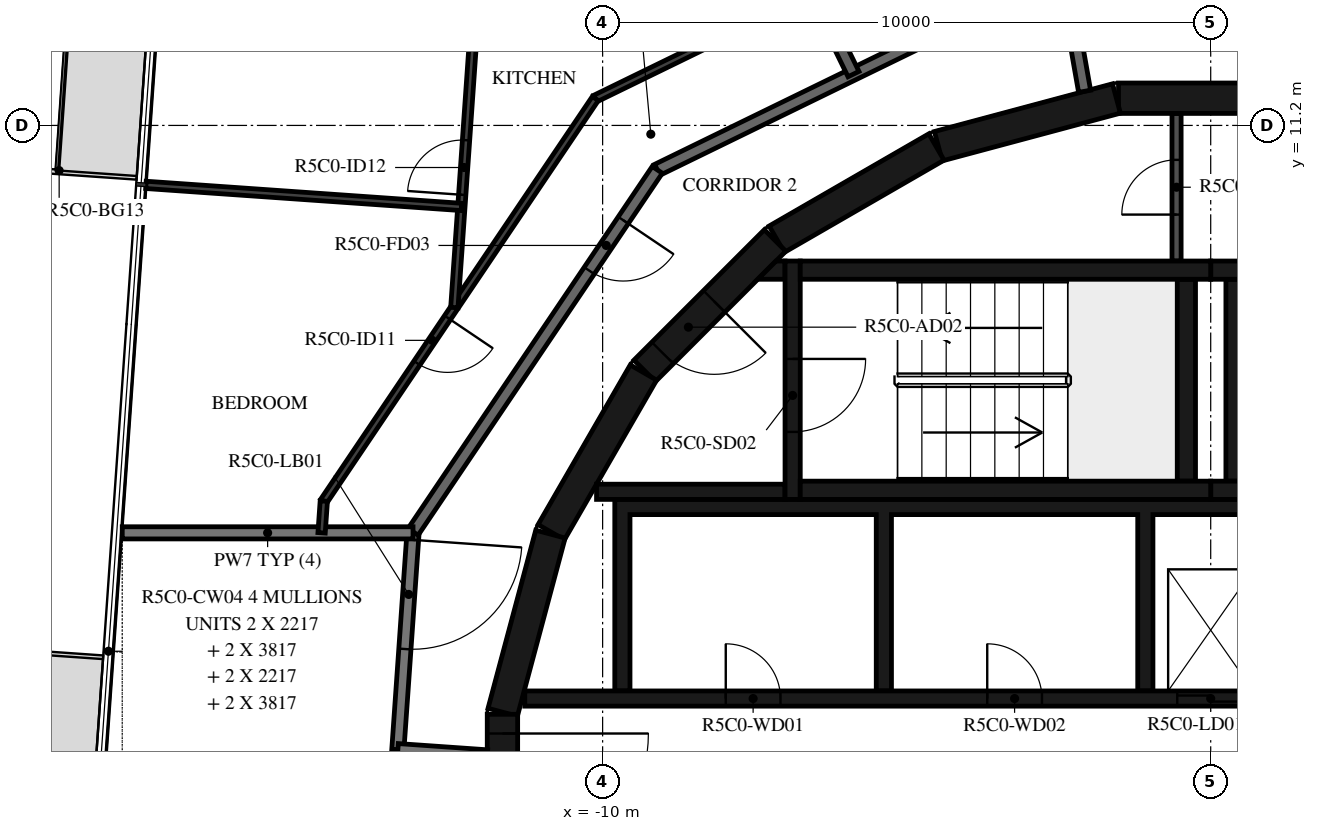
"""IFC4 building model, lengths in metres.
Left out: names, types, materials, properties, quantities, classifications, styles, units other than length and angle.
Written with IfcOpenShell. Run it as: python <this file> out.ifc"""

import sys

from ifc_helpers import new_model, si_unit, direction, frame, frame_2d, origin, place, context, subcontext, project, spatial, polyline, rectangle, outline, extrude, element, fill, save


model = new_model("IFC4")
c1 = context("Model", 3, precision=1e-05, world=origin(), true_north=direction((0.0, 1.0)))
c2 = subcontext(c1, "Body", "Model", "MODEL_VIEW")
j1 = project(units=[si_unit("LENGTHUNIT", "METRE"), si_unit("PLANEANGLEUNIT", "RADIAN")], contexts=[c1])
p1 = place(None, origin())
s1 = spatial("IfcSite", under=j1, at=p1, CompositionType="ELEMENT")
p2 = place(p1, origin())
s2 = spatial("IfcBuilding", under=s1, at=p2, CompositionType="ELEMENT")
p3 = place(p2, frame((0.0, 0.0, 216.4)))
s3 = spatial("IfcBuildingStorey", under=s2, at=p3, CompositionType="ELEMENT", Elevation=216.4)
for number, where, z_axis, x_axis in (
    (1, (1.516, 11.647, 0.0), (0.0, 0.0, 1.0), (-1.0, 0.0, 0.0)),
    (2, (-1.55, 11.643, 0.0), (0.0, 0.0, 1.0), (-0.966, -0.259, 0.0)),
    (3, (-4.51, 10.845, 0.0), (0.0, 0.0, 1.0), (-0.866, -0.5, 0.0)),
):
    element("IfcWall", number, at=place(p3, frame(where, z_axis=z_axis, x_axis=x_axis)), inside=s3, PredefinedType="SHEAR", context=c2, shape_type="SweptSolid", body=[
        extrude(rectangle(XDim=3.033, YDim=0.5, at=frame_2d((1.516, 0.0))), origin(), (0.0, 0.0, 1.0), 3.05),
    ])
p4 = place(p3, frame((-7.164, 9.308, 0.0), z_axis=(0.0, 0.0, 1.0), x_axis=(-0.707106781187, -0.707106781187, 0.0)))
e4 = element("IfcWall", 4, at=p4, inside=s3, PredefinedType="SHEAR", context=c2, shape_type="SweptSolid", body=[
    extrude(rectangle(XDim=3.032, YDim=0.5, at=frame_2d((1.516, 0.0))), origin(), (0.0, 0.0, 1.0), 3.05),
])
p5 = place(p4, frame((1.416, 0.0, 0.0)))
e5 = element("IfcOpeningElement", 5, at=p5, cuts=e4, PredefinedType="OPENING", context=c2, shape_type="SweptSolid", body=[
    extrude(rectangle(XDim=1.2, YDim=2.1, at=frame_2d((0.6, 1.05))), frame((0.0, 0.26, 0.0), z_axis=(0.0, -1.0, 0.0), x_axis=(1.0, 0.0, 0.0)), (0.0, 0.0, 1.0), 0.52),
])
for number, where, z_axis, x_axis in (
    (6, (-9.329, 7.137, 0.0), (0.0, 0.0, 1.0), (-0.5, -0.866, 0.0)),
    (7, (-10.858, 4.479, 0.0), (0.0, 0.0, 1.0), (-0.259, -0.966, 0.0)),
):
    element("IfcWall", number, at=place(p3, frame(where, z_axis=z_axis, x_axis=x_axis)), inside=s3, PredefinedType="SHEAR", context=c2, shape_type="SweptSolid", body=[
        extrude(rectangle(XDim=3.033, YDim=0.5, at=frame_2d((1.516, 0.0))), origin(), (0.0, 0.0, 1.0), 3.05),
    ])
p6 = place(p3, frame((-11.647, 1.516, 0.0), z_axis=(0.0, 0.0, 1.0), x_axis=(0.0, -1.0, 0.0)))
e8 = element("IfcWall", 8, at=p6, inside=s3, PredefinedType="SHEAR", context=c2, shape_type="SweptSolid", body=[
    extrude(rectangle(XDim=3.033, YDim=0.5, at=frame_2d((1.516, 0.0))), origin(), (0.0, 0.0, 1.0), 3.05),
])
p7 = place(p6, frame((0.316, 0.0, 0.0)))
e9 = element("IfcOpeningElement", 9, at=p7, cuts=e8, PredefinedType="OPENING", context=c2, shape_type="SweptSolid", body=[
    extrude(rectangle(XDim=2.4, YDim=2.1, at=frame_2d((1.2, 1.05))), frame((0.0, 0.26, 0.0), z_axis=(0.0, -1.0, 0.0), x_axis=(1.0, 0.0, 0.0)), (0.0, 0.0, 1.0), 0.52),
])
for number, where, z_axis, x_axis in (
    (10, (0.0, 5.2, 0.0), (0.0, 0.0, 1.0), (1.0, 0.0, 0.0)),
    (11, (0.0, 8.82, 0.0), (0.0, 0.0, 1.0), (1.0, 0.0, 0.0)),
):
    element("IfcWall", number, at=place(p3, frame(where, z_axis=z_axis, x_axis=x_axis)), inside=s3, PredefinedType="SHEAR", context=c2, shape_type="SweptSolid", body=[
        extrude(rectangle(XDim=6.75, YDim=0.3, at=frame_2d((3.375, 0.0))), origin(), (0.0, 0.0, 1.0), 3.05),
    ])
p8 = place(p3, frame((0.4, 5.35, 0.0), z_axis=(0.0, 0.0, 1.0), x_axis=(0.0, 1.0, 0.0)))
e12 = element("IfcWall", 12, at=p8, inside=s3, PredefinedType="SHEAR", context=c2, shape_type="SweptSolid", body=[
    extrude(rectangle(XDim=3.32, YDim=0.3, at=frame_2d((1.66, 0.0))), origin(), (0.0, 0.0, 1.0), 3.05),
])
for number, where, z_axis, x_axis in (
    (13, (-6.75, 5.2, 0.0), (0.0, 0.0, 1.0), (1.0, 0.0, 0.0)),
    (14, (-6.75, 8.82, 0.0), (0.0, 0.0, 1.0), (1.0, 0.0, 0.0)),
):
    element("IfcWall", number, at=place(p3, frame(where, z_axis=z_axis, x_axis=x_axis)), inside=s3, PredefinedType="SHEAR", context=c2, shape_type="SweptSolid", body=[
        extrude(rectangle(XDim=6.75, YDim=0.3, at=frame_2d((3.375, 0.0))), origin(), (0.0, 0.0, 1.0), 3.05),
    ])
p9 = place(p3, frame((-0.4, 5.35, 0.0), z_axis=(0.0, 0.0, 1.0), x_axis=(0.0, 1.0, 0.0)))
e15 = element("IfcWall", 15, at=p9, inside=s3, PredefinedType="SHEAR", context=c2, shape_type="SweptSolid", body=[
    extrude(rectangle(XDim=3.32, YDim=0.3, at=frame_2d((1.66, 0.0))), origin(), (0.0, 0.0, 1.0), 3.05),
])
p10 = place(p3, frame((-6.875, 8.97, 0.0), z_axis=(0.0, 0.0, 1.0), x_axis=(0.0, -1.0, 0.0)))
e16 = element("IfcWall", 16, at=p10, inside=s3, PredefinedType="SHEAR", context=c2, shape_type="SweptSolid", body=[
    extrude(rectangle(XDim=3.92, YDim=0.25, at=frame_2d((1.96, 0.0))), origin(), (0.0, 0.0, 1.0), 3.05),
])
p11 = place(p10, frame((1.61, 0.0, 0.0)))
e17 = element("IfcOpeningElement", 17, at=p11, cuts=e16, PredefinedType="OPENING", context=c2, shape_type="SweptSolid", body=[
    extrude(rectangle(XDim=1.2, YDim=2.1, at=frame_2d((0.6, 1.05))), frame((0.0, 0.135, 0.0), z_axis=(0.0, -1.0, 0.0), x_axis=(1.0, 0.0, 0.0)), (0.0, 0.0, 1.0), 0.27),
])
p12 = place(p3, frame((-7.0, 5.175, 0.0), z_axis=(0.0, 0.0, 1.0), x_axis=(-1.0, 0.0, 0.0)))
e18 = element("IfcWall", 18, at=p12, inside=s3, PredefinedType="SHEAR", context=c2, shape_type="SweptSolid", body=[
    extrude(rectangle(XDim=3.1, YDim=0.25, at=frame_2d((1.55, 0.0))), origin(), (0.0, 0.0, 1.0), 3.05),
])
p13 = place(p3, origin())
e19 = element("IfcWall", 19, at=p13, inside=s3, PredefinedType="SHEAR", context=c2, shape_type="SweptSolid", body=[
    extrude(outline(polyline([(-7.148, 8.97), (-7.0, 8.97), (-7.0, 8.67), (-7.448, 8.67), (-7.148, 8.97)])), origin(), (0.0, 0.0, 1.0), 3.05),
])
p14 = place(p3, origin())
e20 = element("IfcWall", 20, at=p14, inside=s3, PredefinedType="SHEAR", context=c2, shape_type="SweptSolid", body=[
    extrude(outline(polyline([(-9.55, 4.8), (-5.5, 4.8), (-5.5, 1.9), (-5.25, 1.9), (-5.25, 4.8), (-1.2, 4.8), (-1.2, 1.9), (-0.95, 1.9), (-0.95, 4.8), (0.95, 4.8), (0.95, 1.9), (1.2, 1.9), (1.2, 4.8), (3.1, 4.8), (3.1, 1.9), (3.35, 1.9), (3.35, 4.8), (5.25, 4.8), (5.25, 1.9), (5.5, 1.9), (5.5, 4.8), (7.4, 4.8), (7.4, 1.9), (7.65, 1.9), (7.65, 4.8), (9.55, 4.8), (9.55, 1.9), (9.8, 1.9), (9.8, 4.8), (9.8, 5.05), (-9.8, 5.05), (-9.8, 4.8), (-9.8, 1.9), (-9.55, 1.9), (-9.55, 4.8)])), origin(), (0.0, 0.0, 1.0), 3.05),
])
p15 = place(p3, frame((-11.28, 1.775, 0.0), z_axis=(0.0, 0.0, 1.0), x_axis=(1.0, 0.0, 0.0)))
e21 = element("IfcWall", 21, at=p15, inside=s3, PredefinedType="SHEAR", context=c2, shape_type="SweptSolid", body=[
    extrude(rectangle(XDim=14.38, YDim=0.25, at=frame_2d((7.19, 0.0))), origin(), (0.0, 0.0, 1.0), 3.05),
])
p16 = place(p15, frame((10.73, 0.0, 0.0)))
e22 = element("IfcOpeningElement", 22, at=p16, cuts=e21, PredefinedType="OPENING", context=c2, shape_type="SweptSolid", body=[
    extrude(rectangle(XDim=1.1, YDim=2.1, at=frame_2d((0.55, 1.05))), frame((0.0, 0.135, 0.0), z_axis=(0.0, -1.0, 0.0), x_axis=(1.0, 0.0, 0.0)), (0.0, 0.0, 1.0), 0.27),
])
p17 = place(p15, frame((12.88, 0.0, 0.0)))
e23 = element("IfcOpeningElement", 23, at=p17, cuts=e21, PredefinedType="OPENING", context=c2, shape_type="SweptSolid", body=[
    extrude(rectangle(XDim=1.1, YDim=2.1, at=frame_2d((0.55, 1.05))), frame((0.0, 0.135, 0.0), z_axis=(0.0, -1.0, 0.0), x_axis=(1.0, 0.0, 0.0)), (0.0, 0.0, 1.0), 0.27),
])
p18 = place(p15, frame((3.305, 0.0, 0.0)))
e24 = element("IfcOpeningElement", 24, at=p18, cuts=e21, PredefinedType="OPENING", context=c2, shape_type="SweptSolid", body=[
    extrude(rectangle(XDim=0.9, YDim=2.1, at=frame_2d((0.45, 1.05))), frame((0.0, 0.135, 0.0), z_axis=(0.0, -1.0, 0.0), x_axis=(1.0, 0.0, 0.0)), (0.0, 0.0, 1.0), 0.27),
])
p19 = place(p15, frame((7.605, 0.0, 0.0)))
e25 = element("IfcOpeningElement", 25, at=p19, cuts=e21, PredefinedType="OPENING", context=c2, shape_type="SweptSolid", body=[
    extrude(rectangle(XDim=0.9, YDim=2.1, at=frame_2d((0.45, 1.05))), frame((0.0, 0.135, 0.0), z_axis=(0.0, -1.0, 0.0), x_axis=(1.0, 0.0, 0.0)), (0.0, 0.0, 1.0), 0.27),
])
p20 = place(p3, frame((-0.562, 8.97, 0.0), z_axis=(0.0, 0.0, 1.0), x_axis=(0.0, 1.0, 0.0)))
e26 = element("IfcWall", 26, at=p20, inside=s3, PredefinedType="PARTITIONING", context=c2, shape_type="SweptSolid", body=[
    extrude(rectangle(XDim=2.427, YDim=0.15, at=frame_2d((1.214, 0.0))), origin(), (0.0, 0.0, 1.0), 3.05),
])
p21 = place(p20, frame((0.764, 0.0, 0.0)))
e27 = element("IfcOpeningElement", 27, at=p21, cuts=e26, PredefinedType="OPENING", context=c2, shape_type="SweptSolid", body=[
    extrude(rectangle(XDim=0.9, YDim=2.1, at=frame_2d((0.45, 1.05))), frame((0.0, 0.085, 0.0), z_axis=(0.0, -1.0, 0.0), x_axis=(1.0, 0.0, 0.0)), (0.0, 0.0, 1.0), 0.17),
])
p22 = place(p3, frame((-13.118, 4.5, 0.0), z_axis=(0.0, 0.0, 1.0), x_axis=(-0.069746872611, -0.99756472159, 0.0)))
e28 = element("IfcWall", 28, at=p22, inside=s3, PredefinedType="STANDARD", context=c2, shape_type="SweptSolid", body=[
    extrude(rectangle(XDim=3.574, YDim=0.2, at=frame_2d((1.787, 0.0))), origin(), (0.0, 0.0, 1.0), 3.05),
])
p23 = place(p22, frame((0.115, 0.0, 0.0)))
e29 = element("IfcOpeningElement", 29, at=p23, cuts=e28, PredefinedType="OPENING", context=c2, shape_type="SweptSolid", body=[
    extrude(rectangle(XDim=1.8, YDim=2.1, at=frame_2d((0.9, 1.05))), frame((0.0, 0.11, 0.0), z_axis=(0.0, -1.0, 0.0), x_axis=(1.0, 0.0, 0.0)), (0.0, 0.0, 1.0), 0.22),
])
p24 = place(p3, frame((-13.367, 0.935, 0.0), z_axis=(0.0, 0.0, 1.0), x_axis=(0.997553656289, -0.069904955655, 0.0)))
e30 = element("IfcWall", 30, at=p24, inside=s3, PredefinedType="STANDARD", context=c2, shape_type="SweptSolid", body=[
    extrude(rectangle(XDim=1.474, YDim=0.2, at=frame_2d((0.737, 0.0))), origin(), (0.0, 0.0, 1.0), 3.05),
])
p25 = place(p3, frame((-2.074, 11.761, 0.0), z_axis=(0.0, 0.0, 1.0), x_axis=(-0.173740587112, 0.984791454263, 0.0)))
e31 = element("IfcWall", 31, at=p25, inside=s3, PredefinedType="STANDARD", context=c2, shape_type="SweptSolid", body=[
    extrude(rectangle(XDim=1.867, YDim=0.2, at=frame_2d((0.934, 0.0))), origin(), (0.0, 0.0, 1.0), 3.05),
])
p26 = place(p3, frame((-2.647, 13.618, 0.0), z_axis=(0.0, 0.0, 1.0), x_axis=(-0.898796543751, -0.438366026218, 0.0)))
e32 = element("IfcWall", 32, at=p26, inside=s3, PredefinedType="STANDARD", context=c2, shape_type="SweptSolid", body=[
    extrude(rectangle(XDim=7.181, YDim=0.2, at=frame_2d((3.591, 0.0))), origin(), (0.0, 0.0, 1.0), 3.05),
])
p27 = place(p3, frame((-9.101, 10.47, 0.0), z_axis=(0.0, 0.0, 1.0), x_axis=(-0.559195469534, -0.829035841718, 0.0)))
e33 = element("IfcWall", 33, at=p27, inside=s3, PredefinedType="STANDARD", context=c2, shape_type="SweptSolid", body=[
    extrude(rectangle(XDim=7.181, YDim=0.2, at=frame_2d((3.591, 0.0))), origin(), (0.0, 0.0, 1.0), 3.05),
])
p28 = place(p27, frame((1.0, 0.0, 0.0)))
e34 = element("IfcOpeningElement", 34, at=p28, cuts=e33, PredefinedType="OPENING", context=c2, shape_type="SweptSolid", body=[
    extrude(rectangle(XDim=1.0, YDim=2.1, at=frame_2d((0.5, 1.05))), frame((0.0, 0.11, 0.0), z_axis=(0.0, -1.0, 0.0), x_axis=(1.0, 0.0, 0.0)), (0.0, 0.0, 1.0), 0.22),
])
p29 = place(p3, frame((-13.118, 4.5, 0.0), z_axis=(0.0, 0.0, 1.0), x_axis=(-1.0, 0.0, 0.0)))
e35 = element("IfcWall", 35, at=p29, inside=s3, PredefinedType="STANDARD", context=c2, shape_type="SweptSolid", body=[
    extrude(rectangle(XDim=4.782, YDim=0.2, at=frame_2d((2.391, 0.0))), origin(), (0.0, 0.0, 1.0), 3.05),
])
p30 = place(p3, frame((-6.522, 13.373, 0.0), z_axis=(0.0, 0.0, 1.0), x_axis=(0.438277270821, -0.8988398266, 0.0)))
e36 = element("IfcWall", 36, at=p30, inside=s3, PredefinedType="STANDARD", context=c2, shape_type="SweptSolid", body=[
    extrude(rectangle(XDim=1.479, YDim=0.2, at=frame_2d((0.74, 0.0))), origin(), (0.0, 0.0, 1.0), 3.05),
])
p31 = place(p3, frame((-8.405, 12.479, 0.0), z_axis=(0.0, 0.0, 1.0), x_axis=(-0.898784427692, -0.438390867307, 0.0)))
e37 = element("IfcWall", 37, at=p31, inside=s3, PredefinedType="PARTITIONING", context=c2, shape_type="SweptSolid", body=[
    extrude(rectangle(XDim=1.908, YDim=0.12, at=frame_2d((0.954, 0.0))), origin(), (0.0, 0.0, 1.0), 3.05),
])
p32 = place(p3, frame((-10.12, 11.642, 0.0), z_axis=(0.0, 0.0, 1.0), x_axis=(-0.55920080659, -0.829032241779, 0.0)))
e38 = element("IfcWall", 38, at=p32, inside=s3, PredefinedType="PARTITIONING", context=c2, shape_type="SweptSolid", body=[
    extrude(rectangle(XDim=7.985, YDim=0.12, at=frame_2d((3.992, 0.0))), origin(), (0.0, 0.0, 1.0), 3.05),
])
p33 = place(p32, frame((4.346, 0.0, 0.0)))
e39 = element("IfcOpeningElement", 39, at=p33, cuts=e38, PredefinedType="OPENING", context=c2, shape_type="SweptSolid", body=[
    extrude(rectangle(XDim=0.9, YDim=2.1, at=frame_2d((0.45, 1.05))), frame((0.0, 0.07, 0.0), z_axis=(0.0, -1.0, 0.0), x_axis=(1.0, 0.0, 0.0)), (0.0, 0.0, 1.0), 0.14),
])
p34 = place(p3, frame((-14.585, 5.022, 0.0), z_axis=(0.0, 0.0, 1.0), x_axis=(-0.069490327804, -0.997582625321, 0.0)))
e40 = element("IfcWall", 40, at=p34, inside=s3, PredefinedType="PARTITIONING", context=c2, shape_type="SweptSolid", body=[
    extrude(rectangle(XDim=0.523, YDim=0.12, at=frame_2d((0.262, 0.0))), origin(), (0.0, 0.0, 1.0), 3.05),
])
p35 = place(p3, frame((-12.439, 8.204, 0.0), z_axis=(0.0, 0.0, 1.0), x_axis=(0.069750037523, 0.997564500303, 0.0)))
e41 = element("IfcWall", 41, at=p35, inside=s3, PredefinedType="PARTITIONING", context=c2, shape_type="SweptSolid", body=[
    extrude(rectangle(XDim=10.014, YDim=0.12, at=frame_2d((5.007, 0.0))), origin(), (0.0, 0.0, 1.0), 3.05),
])
p36 = place(p35, frame((1.859, 0.0, 0.0)))
e42 = element("IfcOpeningElement", 42, at=p36, cuts=e41, PredefinedType="OPENING", context=c2, shape_type="SweptSolid", body=[
    extrude(rectangle(XDim=0.9, YDim=2.1, at=frame_2d((0.45, 1.05))), frame((0.0, 0.07, 0.0), z_axis=(0.0, -1.0, 0.0), x_axis=(1.0, 0.0, 0.0)), (0.0, 0.0, 1.0), 0.14),
])
p37 = place(p3, frame((-17.51, 10.222, 0.0), z_axis=(0.0, 0.0, 1.0), x_axis=(0.997563184303, -0.069768856397, 0.0)))
e43 = element("IfcWall", 43, at=p37, inside=s3, PredefinedType="PARTITIONING", context=c2, shape_type="SweptSolid", body=[
    extrude(rectangle(XDim=5.2, YDim=0.12, at=frame_2d((2.6, 0.0))), origin(), (0.0, 0.0, 1.0), 3.05),
])
p38 = place(p11, origin())
e44 = element("IfcDoor", 44, at=p38, inside=s3, OperationType="SINGLE_SWING_LEFT", PredefinedType="DOOR", context=c2, shape_type="SweptSolid", body=[
    extrude(rectangle(XDim=1.2, YDim=2.1, at=frame_2d((0.6, 1.05))), frame((0.0, 0.025, 0.0), z_axis=(0.0, -1.0, 0.0), x_axis=(1.0, 0.0, 0.0)), (0.0, 0.0, 1.0), 0.05),
])
fill(e17, e44)
p39 = place(p5, origin())
e45 = element("IfcDoor", 45, at=p39, inside=s3, OperationType="SINGLE_SWING_RIGHT", PredefinedType="DOOR", context=c2, shape_type="SweptSolid", body=[
    extrude(rectangle(XDim=1.2, YDim=2.1, at=frame_2d((0.6, 1.05))), frame((0.0, 0.025, 0.0), z_axis=(0.0, -1.0, 0.0), x_axis=(1.0, 0.0, 0.0)), (0.0, 0.0, 1.0), 0.05),
])
fill(e5, e45)
p40 = place(p7, origin())
e46 = element("IfcDoor", 46, at=p40, inside=s3, OperationType="DOUBLE_DOOR_SINGLE_SWING", PredefinedType="DOOR", context=c2, shape_type="SweptSolid", body=[
    extrude(rectangle(XDim=2.4, YDim=2.1, at=frame_2d((1.2, 1.05))), frame((0.0, 0.025, 0.0), z_axis=(0.0, -1.0, 0.0), x_axis=(1.0, 0.0, 0.0)), (0.0, 0.0, 1.0), 0.05),
])
fill(e9, e46)
p41 = place(p16, origin())
e47 = element("IfcDoor", 47, at=p41, inside=s3, OperationType="DOUBLE_DOOR_SLIDING", PredefinedType="DOOR", context=c2, shape_type="SweptSolid", body=[
    extrude(rectangle(XDim=1.1, YDim=2.1, at=frame_2d((0.55, 1.05))), frame((0.0, 0.025, 0.0), z_axis=(0.0, -1.0, 0.0), x_axis=(1.0, 0.0, 0.0)), (0.0, 0.0, 1.0), 0.05),
])
fill(e22, e47)
p42 = place(p18, origin())
e48 = element("IfcDoor", 48, at=p42, inside=s3, OperationType="SINGLE_SWING_LEFT", PredefinedType="DOOR", context=c2, shape_type="SweptSolid", body=[
    extrude(rectangle(XDim=0.9, YDim=2.1, at=frame_2d((0.45, 1.05))), frame((0.0, 0.025, 0.0), z_axis=(0.0, -1.0, 0.0), x_axis=(1.0, 0.0, 0.0)), (0.0, 0.0, 1.0), 0.05),
])
fill(e24, e48)
p43 = place(p19, origin())
e49 = element("IfcDoor", 49, at=p43, inside=s3, OperationType="SINGLE_SWING_RIGHT", PredefinedType="DOOR", context=c2, shape_type="SweptSolid", body=[
    extrude(rectangle(XDim=0.9, YDim=2.1, at=frame_2d((0.45, 1.05))), frame((0.0, 0.025, 0.0), z_axis=(0.0, -1.0, 0.0), x_axis=(1.0, 0.0, 0.0)), (0.0, 0.0, 1.0), 0.05),
])
fill(e25, e49)
p44 = place(p21, origin())
e50 = element("IfcDoor", 50, at=p44, inside=s3, OperationType="SINGLE_SWING_LEFT", PredefinedType="DOOR", context=c2, shape_type="SweptSolid", body=[
    extrude(rectangle(XDim=0.9, YDim=2.1, at=frame_2d((0.45, 1.05))), frame((0.0, 0.025, 0.0), z_axis=(0.0, -1.0, 0.0), x_axis=(1.0, 0.0, 0.0)), (0.0, 0.0, 1.0), 0.05),
])
fill(e27, e50)
p45 = place(p28, origin())
e51 = element("IfcDoor", 51, at=p45, inside=s3, OperationType="SINGLE_SWING_LEFT", PredefinedType="DOOR", context=c2, shape_type="SweptSolid", body=[
    extrude(rectangle(XDim=1.0, YDim=2.1, at=frame_2d((0.5, 1.05))), frame((0.0, 0.025, 0.0), z_axis=(0.0, -1.0, 0.0), x_axis=(1.0, 0.0, 0.0)), (0.0, 0.0, 1.0), 0.05),
])
fill(e34, e51)
p46 = place(p33, origin())
e52 = element("IfcDoor", 52, at=p46, inside=s3, OperationType="SINGLE_SWING_LEFT", PredefinedType="DOOR", context=c2, shape_type="SweptSolid", body=[
    extrude(rectangle(XDim=0.9, YDim=2.1, at=frame_2d((0.45, 1.05))), frame((0.0, 0.025, 0.0), z_axis=(0.0, -1.0, 0.0), x_axis=(1.0, 0.0, 0.0)), (0.0, 0.0, 1.0), 0.05),
])
fill(e39, e52)
p47 = place(p36, origin())
e53 = element("IfcDoor", 53, at=p47, inside=s3, OperationType="SINGLE_SWING_LEFT", PredefinedType="DOOR", context=c2, shape_type="SweptSolid", body=[
    extrude(rectangle(XDim=0.9, YDim=2.1, at=frame_2d((0.45, 1.05))), frame((0.0, 0.025, 0.0), z_axis=(0.0, -1.0, 0.0), x_axis=(1.0, 0.0, 0.0)), (0.0, 0.0, 1.0), 0.05),
])
fill(e42, e53)
p48 = place(p23, origin())
e54 = element("IfcDoor", 54, at=p48, inside=s3, OperationType="DOUBLE_DOOR_SINGLE_SWING", PredefinedType="DOOR", context=c2, shape_type="SweptSolid", body=[
    extrude(rectangle(XDim=1.8, YDim=2.1, at=frame_2d((0.9, 1.05))), frame((0.0, 0.025, 0.0), z_axis=(0.0, -1.0, 0.0), x_axis=(1.0, 0.0, 0.0)), (0.0, 0.0, 1.0), 0.05),
])
fill(e29, e54)
save(model, sys.argv[1])
